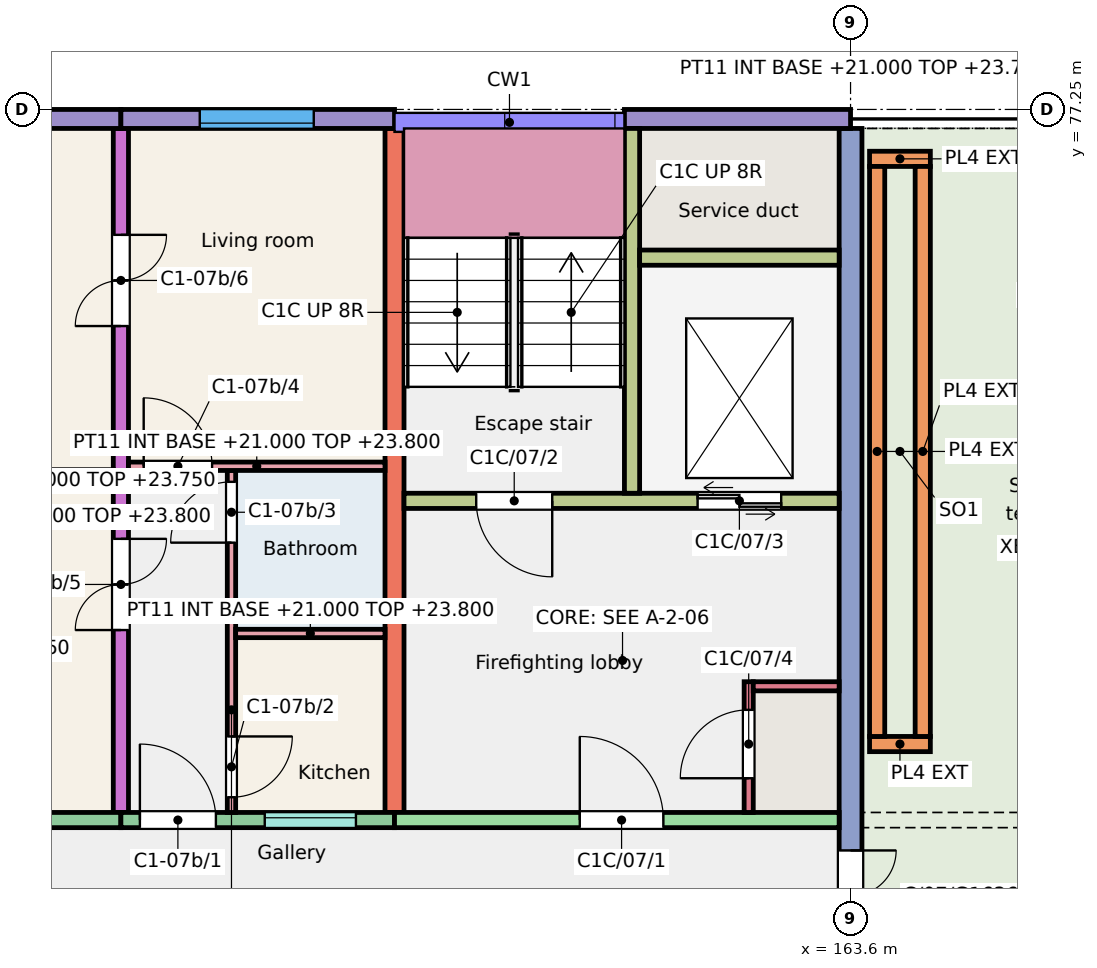
"""IFC4 building model, lengths in metres.
Left out: names, types, materials, properties, quantities, classifications, styles, units other than length and angle.
Written with IfcOpenShell. Run it as: python <this file> out.ifc"""

import sys

from ifc_helpers import new_model, si_unit, direction, frame, frame_2d, origin, place, context, subcontext, project, spatial, rectangle, extrude, element, fill, save


model = new_model("IFC4")
c1 = context("Model", 3, precision=1e-05, world=origin(), true_north=direction((0.0, 1.0)))
c2 = subcontext(c1, "Body", "Model", "MODEL_VIEW")
j1 = project(units=[si_unit("LENGTHUNIT", "METRE"), si_unit("PLANEANGLEUNIT", "RADIAN")], contexts=[c1])
p1 = place(None, origin())
s1 = spatial("IfcSite", under=j1, at=p1, CompositionType="ELEMENT")
p2 = place(p1, origin())
s2 = spatial("IfcBuilding", under=s1, at=p2, CompositionType="ELEMENT")
p3 = place(p2, frame((0.0, 0.0, 21.0)))
s3 = spatial("IfcBuildingStorey", under=s2, at=p3, CompositionType="ELEMENT", Elevation=21.0)
p4 = place(p3, frame((154.0, 68.0, 0.0), z_axis=(0.0, 0.0, 1.0), x_axis=(0.0, 1.0, 0.0)))
e1 = element("IfcWall", 1, at=p4, inside=s3, PredefinedType="SHEAR", context=c2, shape_type="SweptSolid", body=[
    extrude(rectangle(XDim=9.0, YDim=0.2, at=frame_2d((4.5, 0.0))), origin(), (0.0, 0.0, 1.0), 3.0),
])
p5 = place(p4, frame((2.4, 0.0, 0.0)))
e2 = element("IfcOpeningElement", 2, at=p5, cuts=e1, PredefinedType="OPENING", context=c2, shape_type="SweptSolid", body=[
    extrude(rectangle(XDim=1.2, YDim=2.1, at=frame_2d((0.6, 1.05))), frame((0.0, 0.11, 0.0), z_axis=(0.0, -1.0, 0.0), x_axis=(1.0, 0.0, 0.0)), (0.0, 0.0, 1.0), 0.22),
])
p6 = place(p4, frame((6.4, 0.0, 0.0)))
e3 = element("IfcOpeningElement", 3, at=p6, cuts=e1, PredefinedType="OPENING", context=c2, shape_type="SweptSolid", body=[
    extrude(rectangle(XDim=1.2, YDim=2.1, at=frame_2d((0.6, 1.05))), frame((0.0, 0.11, 0.0), z_axis=(0.0, -1.0, 0.0), x_axis=(1.0, 0.0, 0.0)), (0.0, 0.0, 1.0), 0.22),
])
p7 = place(p3, frame((157.6, 68.0, 0.0), z_axis=(0.0, 0.0, 1.0), x_axis=(0.0, 1.0, 0.0)))
e4 = element("IfcWall", 4, at=p7, inside=s3, PredefinedType="SHEAR", context=c2, shape_type="SweptSolid", body=[
    extrude(rectangle(XDim=9.0, YDim=0.25, at=frame_2d((4.5, 0.0))), origin(), (0.0, 0.0, 1.0), 3.0),
])
p8 = place(p3, frame((163.6, 66.0, 0.0), z_axis=(0.0, 0.0, 1.0), x_axis=(0.0, 1.0, 0.0)))
e5 = element("IfcWall", 5, at=p8, inside=s3, PredefinedType="SHEAR", context=c2, shape_type="SweptSolid", body=[
    extrude(rectangle(XDim=11.0, YDim=0.3, at=frame_2d((5.5, 0.0))), origin(), (0.0, 0.0, 1.0), 3.0),
])
p9 = place(p8, frame((0.3, 0.0, 0.0)))
e6 = element("IfcOpeningElement", 6, at=p9, cuts=e5, PredefinedType="OPENING", context=c2, shape_type="SweptSolid", body=[
    extrude(rectangle(XDim=1.2, YDim=2.1, at=frame_2d((0.6, 1.05))), frame((0.0, 0.16, 0.0), z_axis=(0.0, -1.0, 0.0), x_axis=(1.0, 0.0, 0.0)), (0.0, 0.0, 1.0), 0.32),
])
p10 = place(p3, frame((150.4, 77.125, 0.0), z_axis=(0.0, 0.0, 1.0), x_axis=(1.0, 0.0, 0.0)))
e7 = element("IfcWall", 7, at=p10, inside=s3, PredefinedType="SOLIDWALL", context=c2, shape_type="SweptSolid", body=[
    extrude(rectangle(XDim=3.6, YDim=0.25, at=frame_2d((1.8, 0.0))), origin(), (0.0, 0.0, 1.0), 3.0),
])
p11 = place(p10, frame((1.05, 0.0, 0.9)))
e8 = element("IfcOpeningElement", 8, at=p11, cuts=e7, PredefinedType="OPENING", context=c2, shape_type="SweptSolid", body=[
    extrude(rectangle(XDim=1.5, YDim=1.5, at=frame_2d((0.75, 0.75))), frame((0.0, 0.135, 0.0), z_axis=(0.0, -1.0, 0.0), x_axis=(1.0, 0.0, 0.0)), (0.0, 0.0, 1.0), 0.27),
])
p12 = place(p3, frame((150.4, 67.9, 0.0), z_axis=(0.0, 0.0, 1.0), x_axis=(1.0, 0.0, 0.0)))
e9 = element("IfcWall", 9, at=p12, inside=s3, PredefinedType="SOLIDWALL", context=c2, shape_type="SweptSolid", body=[
    extrude(rectangle(XDim=3.6, YDim=0.2, at=frame_2d((1.8, 0.0))), origin(), (0.0, 0.0, 1.0), 3.0),
])
p13 = place(p12, frame((1.05, 0.0, 0.9)))
e10 = element("IfcOpeningElement", 10, at=p13, cuts=e9, PredefinedType="OPENING", context=c2, shape_type="SweptSolid", body=[
    extrude(rectangle(XDim=1.5, YDim=1.5, at=frame_2d((0.75, 0.75))), frame((0.0, 0.11, 0.0), z_axis=(0.0, -1.0, 0.0), x_axis=(1.0, 0.0, 0.0)), (0.0, 0.0, 1.0), 0.22),
])
p14 = place(p3, frame((154.0, 77.125, 0.0), z_axis=(0.0, 0.0, 1.0), x_axis=(1.0, 0.0, 0.0)))
e11 = element("IfcWall", 11, at=p14, inside=s3, PredefinedType="SOLIDWALL", context=c2, shape_type="SweptSolid", body=[
    extrude(rectangle(XDim=3.6, YDim=0.25, at=frame_2d((1.8, 0.0))), origin(), (0.0, 0.0, 1.0), 3.0),
])
p15 = place(p14, frame((1.038, 0.0, 0.9)))
e12 = element("IfcOpeningElement", 12, at=p15, cuts=e11, PredefinedType="OPENING", context=c2, shape_type="SweptSolid", body=[
    extrude(rectangle(XDim=1.5, YDim=1.5, at=frame_2d((0.75, 0.75))), frame((0.0, 0.135, 0.0), z_axis=(0.0, -1.0, 0.0), x_axis=(1.0, 0.0, 0.0)), (0.0, 0.0, 1.0), 0.27),
])
p16 = place(p3, frame((154.0, 67.9, 0.0), z_axis=(0.0, 0.0, 1.0), x_axis=(1.0, 0.0, 0.0)))
e13 = element("IfcWall", 13, at=p16, inside=s3, PredefinedType="SOLIDWALL", context=c2, shape_type="SweptSolid", body=[
    extrude(rectangle(XDim=3.6, YDim=0.2, at=frame_2d((1.8, 0.0))), origin(), (0.0, 0.0, 1.0), 3.0),
])
p17 = place(p16, frame((1.893, 0.0, 1.1)))
e14 = element("IfcOpeningElement", 14, at=p17, cuts=e13, PredefinedType="OPENING", context=c2, shape_type="SweptSolid", body=[
    extrude(rectangle(XDim=1.2, YDim=1.3, at=frame_2d((0.6, 0.65))), frame((0.0, 0.11, 0.0), z_axis=(0.0, -1.0, 0.0), x_axis=(1.0, 0.0, 0.0)), (0.0, 0.0, 1.0), 0.22),
])
p18 = place(p16, frame((0.25, 0.0, 0.0)))
e15 = element("IfcOpeningElement", 15, at=p18, cuts=e13, PredefinedType="OPENING", context=c2, shape_type="SweptSolid", body=[
    extrude(rectangle(XDim=1.0, YDim=2.1, at=frame_2d((0.5, 1.05))), frame((0.0, 0.11, 0.0), z_axis=(0.0, -1.0, 0.0), x_axis=(1.0, 0.0, 0.0)), (0.0, 0.0, 1.0), 0.22),
])
p19 = place(p3, frame((160.625, 77.125, 0.0), z_axis=(0.0, 0.0, 1.0), x_axis=(1.0, 0.0, 0.0)))
e16 = element("IfcWall", 16, at=p19, inside=s3, PredefinedType="SOLIDWALL", context=c2, shape_type="SweptSolid", body=[
    extrude(rectangle(XDim=2.975, YDim=0.25, at=frame_2d((1.488, 0.0))), origin(), (0.0, 0.0, 1.0), 3.0),
])
p20 = place(p3, frame((157.6, 67.9, 0.0), z_axis=(0.0, 0.0, 1.0), x_axis=(1.0, 0.0, 0.0)))
e17 = element("IfcWall", 17, at=p20, inside=s3, PredefinedType="SHEAR", context=c2, shape_type="SweptSolid", body=[
    extrude(rectangle(XDim=5.85, YDim=0.2, at=frame_2d((2.925, 0.0))), origin(), (0.0, 0.0, 1.0), 3.0),
])
p21 = place(p20, frame((2.438, 0.0, 0.0)))
e18 = element("IfcOpeningElement", 18, at=p21, cuts=e17, PredefinedType="OPENING", context=c2, shape_type="SweptSolid", body=[
    extrude(rectangle(XDim=1.1, YDim=2.1, at=frame_2d((0.55, 1.05))), frame((0.0, 0.11, 0.0), z_axis=(0.0, -1.0, 0.0), x_axis=(1.0, 0.0, 0.0)), (0.0, 0.0, 1.0), 0.22),
])
p22 = place(p3, frame((157.725, 72.1, 0.0), z_axis=(0.0, 0.0, 1.0), x_axis=(1.0, 0.0, 0.0)))
e19 = element("IfcWall", 19, at=p22, inside=s3, PredefinedType="SHEAR", context=c2, shape_type="SweptSolid", body=[
    extrude(rectangle(XDim=5.725, YDim=0.2, at=frame_2d((2.862, 0.0))), origin(), (0.0, 0.0, 1.0), 3.0),
])
p23 = place(p22, frame((0.95, 0.0, 0.0)))
e20 = element("IfcOpeningElement", 20, at=p23, cuts=e19, PredefinedType="OPENING", context=c2, shape_type="SweptSolid", body=[
    extrude(rectangle(XDim=1.0, YDim=2.1, at=frame_2d((0.5, 1.05))), frame((0.0, 0.11, 0.0), z_axis=(0.0, -1.0, 0.0), x_axis=(1.0, 0.0, 0.0)), (0.0, 0.0, 1.0), 0.22),
])
p24 = place(p22, frame((3.863, 0.0, 0.0)))
e21 = element("IfcOpeningElement", 21, at=p24, cuts=e19, PredefinedType="OPENING", context=c2, shape_type="SweptSolid", body=[
    extrude(rectangle(XDim=1.1, YDim=2.1, at=frame_2d((0.55, 1.05))), frame((0.0, 0.11, 0.0), z_axis=(0.0, -1.0, 0.0), x_axis=(1.0, 0.0, 0.0)), (0.0, 0.0, 1.0), 0.22),
])
p25 = place(p3, frame((160.725, 72.2, 0.0), z_axis=(0.0, 0.0, 1.0), x_axis=(0.0, 1.0, 0.0)))
e22 = element("IfcWall", 22, at=p25, inside=s3, PredefinedType="SHEAR", context=c2, shape_type="SweptSolid", body=[
    extrude(rectangle(XDim=4.8, YDim=0.2, at=frame_2d((2.4, 0.0))), origin(), (0.0, 0.0, 1.0), 3.0),
])
p26 = place(p3, frame((160.825, 75.3, 0.0), z_axis=(0.0, 0.0, 1.0), x_axis=(1.0, 0.0, 0.0)))
e23 = element("IfcWall", 23, at=p26, inside=s3, PredefinedType="SHEAR", context=c2, shape_type="SweptSolid", body=[
    extrude(rectangle(XDim=2.625, YDim=0.2, at=frame_2d((1.312, 0.0))), origin(), (0.0, 0.0, 1.0), 3.0),
])
p27 = place(p3, frame((162.26, 68.0, 0.0), z_axis=(0.0, 0.0, 1.0), x_axis=(0.0, 1.0, 0.0)))
e24 = element("IfcWall", 24, at=p27, inside=s3, PredefinedType="SHEAR", context=c2, shape_type="SweptSolid", body=[
    extrude(rectangle(XDim=1.72, YDim=0.12, at=frame_2d((0.86, 0.0))), origin(), (0.0, 0.0, 1.0), 3.0),
])
p28 = place(p27, frame((0.45, 0.0, 0.0)))
e25 = element("IfcOpeningElement", 25, at=p28, cuts=e24, PredefinedType="OPENING", context=c2, shape_type="SweptSolid", body=[
    extrude(rectangle(XDim=0.9, YDim=2.1, at=frame_2d((0.45, 1.05))), frame((0.0, 0.07, 0.0), z_axis=(0.0, -1.0, 0.0), x_axis=(1.0, 0.0, 0.0)), (0.0, 0.0, 1.0), 0.14),
])
p29 = place(p3, frame((162.32, 69.66, 0.0), z_axis=(0.0, 0.0, 1.0), x_axis=(1.0, 0.0, 0.0)))
e26 = element("IfcWall", 26, at=p29, inside=s3, PredefinedType="SHEAR", context=c2, shape_type="SweptSolid", body=[
    extrude(rectangle(XDim=1.13, YDim=0.12, at=frame_2d((0.565, 0.0))), origin(), (0.0, 0.0, 1.0), 3.0),
])
for number, where, z_axis, x_axis in (
    (27, (163.85, 68.9, 0.01), (0.0, 0.0, 1.0), (1.0, 0.0, 0.0)),
    (28, (163.85, 76.6, 0.01), (0.0, 0.0, 1.0), (1.0, 0.0, 0.0)),
):
    element("IfcWall", number, at=place(p3, frame(where, z_axis=z_axis, x_axis=x_axis)), inside=s3, PredefinedType="SOLIDWALL", context=c2, shape_type="SweptSolid", body=[
        extrude(rectangle(XDim=0.8, YDim=0.2, at=frame_2d((0.4, 0.0))), origin(), (0.0, 0.0, 1.0), 0.45),
    ])
for number, where, z_axis, x_axis in (
    (29, (163.95, 69.0, 0.01), (0.0, 0.0, 1.0), (0.0, 1.0, 0.0)),
    (30, (164.55, 69.0, 0.01), (0.0, 0.0, 1.0), (0.0, 1.0, 0.0)),
):
    element("IfcWall", number, at=place(p3, frame(where, z_axis=z_axis, x_axis=x_axis)), inside=s3, PredefinedType="SOLIDWALL", context=c2, shape_type="SweptSolid", body=[
        extrude(rectangle(XDim=7.5, YDim=0.2, at=frame_2d((3.75, 0.0))), origin(), (0.0, 0.0, 1.0), 0.45),
    ])
p30 = place(p3, frame((155.455, 68.0, 0.0), z_axis=(0.0, 0.0, 1.0), x_axis=(0.0, 1.0, 0.0)))
e31 = element("IfcWall", 31, at=p30, inside=s3, PredefinedType="PARTITIONING", context=c2, shape_type="SweptSolid", body=[
    extrude(rectangle(XDim=4.5, YDim=0.11, at=frame_2d((2.25, 0.0))), origin(), (0.0, 0.0, 1.0), 2.8),
])
p31 = place(p30, frame((0.2, 0.0, 0.0)))
e32 = element("IfcOpeningElement", 32, at=p31, cuts=e31, PredefinedType="OPENING", context=c2, shape_type="SweptSolid", body=[
    extrude(rectangle(XDim=0.8, YDim=2.1, at=frame_2d((0.4, 1.05))), frame((0.0, 0.065, 0.0), z_axis=(0.0, -1.0, 0.0), x_axis=(1.0, 0.0, 0.0)), (0.0, 0.0, 1.0), 0.13),
])
p32 = place(p30, frame((3.55, 0.0, 0.0)))
e33 = element("IfcOpeningElement", 33, at=p32, cuts=e31, PredefinedType="OPENING", context=c2, shape_type="SweptSolid", body=[
    extrude(rectangle(XDim=0.8, YDim=2.1, at=frame_2d((0.4, 1.05))), frame((0.0, 0.065, 0.0), z_axis=(0.0, -1.0, 0.0), x_axis=(1.0, 0.0, 0.0)), (0.0, 0.0, 1.0), 0.13),
])
p33 = place(p3, frame((155.51, 70.355, 0.0), z_axis=(0.0, 0.0, 1.0), x_axis=(1.0, 0.0, 0.0)))
e34 = element("IfcWall", 34, at=p33, inside=s3, PredefinedType="PARTITIONING", context=c2, shape_type="SweptSolid", body=[
    extrude(rectangle(XDim=1.965, YDim=0.11, at=frame_2d((0.982, 0.0))), origin(), (0.0, 0.0, 1.0), 2.8),
])
p34 = place(p3, frame((154.1, 72.555, 0.0), z_axis=(0.0, 0.0, 1.0), x_axis=(1.0, 0.0, 0.0)))
e35 = element("IfcWall", 35, at=p34, inside=s3, PredefinedType="PARTITIONING", context=c2, shape_type="SweptSolid", body=[
    extrude(rectangle(XDim=3.375, YDim=0.11, at=frame_2d((1.688, 0.0))), origin(), (0.0, 0.0, 1.0), 2.8),
])
p35 = place(p34, frame((0.2, 0.0, 0.0)))
e36 = element("IfcOpeningElement", 36, at=p35, cuts=e35, PredefinedType="OPENING", context=c2, shape_type="SweptSolid", body=[
    extrude(rectangle(XDim=0.9, YDim=2.1, at=frame_2d((0.45, 1.05))), frame((0.0, 0.065, 0.0), z_axis=(0.0, -1.0, 0.0), x_axis=(1.0, 0.0, 0.0)), (0.0, 0.0, 1.0), 0.13),
])
p36 = place(p3, frame((150.5, 72.455, 0.0), z_axis=(0.0, 0.0, 1.0), x_axis=(1.0, 0.0, 0.0)))
e37 = element("IfcWall", 37, at=p36, inside=s3, PredefinedType="PARTITIONING", context=c2, shape_type="SweptSolid", body=[
    extrude(rectangle(XDim=3.4, YDim=0.11, at=frame_2d((1.7, 0.0))), origin(), (0.0, 0.0, 1.0), 2.8),
])
p37 = place(p17, origin())
e38 = element("IfcWindow", 38, at=p37, inside=s3, PartitioningType="SINGLE_PANEL", PredefinedType="WINDOW", context=c2, shape_type="SweptSolid", body=[
    extrude(rectangle(XDim=1.2, YDim=1.3, at=frame_2d((0.6, 0.65))), frame((0.0, 0.06, 0.0), z_axis=(0.0, -1.0, 0.0), x_axis=(1.0, 0.0, 0.0)), (0.0, 0.0, 1.0), 0.06),
])
fill(e14, e38)
p38 = place(p15, origin())
e39 = element("IfcWindow", 39, at=p38, inside=s3, PartitioningType="SINGLE_PANEL", PredefinedType="WINDOW", context=c2, shape_type="SweptSolid", body=[
    extrude(rectangle(XDim=1.5, YDim=1.5, at=frame_2d((0.75, 0.75))), frame((0.0, -0.025, 0.0), z_axis=(0.0, -1.0, 0.0), x_axis=(1.0, 0.0, 0.0)), (0.0, 0.0, 1.0), 0.06),
])
fill(e12, e39)
p39 = place(p18, origin())
e40 = element("IfcDoor", 40, at=p39, inside=s3, OperationType="SINGLE_SWING_LEFT", PredefinedType="DOOR", context=c2, shape_type="SweptSolid", body=[
    extrude(rectangle(XDim=1.0, YDim=2.1, at=frame_2d((0.5, 1.05))), frame((0.0, 0.025, 0.0), z_axis=(0.0, -1.0, 0.0), x_axis=(1.0, 0.0, 0.0)), (0.0, 0.0, 1.0), 0.05),
])
fill(e15, e40)
p40 = place(p31, origin())
e41 = element("IfcDoor", 41, at=p40, inside=s3, OperationType="SINGLE_SWING_RIGHT", PredefinedType="DOOR", context=c2, shape_type="SweptSolid", body=[
    extrude(rectangle(XDim=0.8, YDim=2.1, at=frame_2d((0.4, 1.05))), frame((0.0, 0.025, 0.0), z_axis=(0.0, -1.0, 0.0), x_axis=(1.0, 0.0, 0.0)), (0.0, 0.0, 1.0), 0.05),
])
fill(e32, e41)
p41 = place(p32, origin())
e42 = element("IfcDoor", 42, at=p41, inside=s3, OperationType="SINGLE_SWING_LEFT", PredefinedType="DOOR", context=c2, shape_type="SweptSolid", body=[
    extrude(rectangle(XDim=0.8, YDim=2.1, at=frame_2d((0.4, 1.05))), frame((0.0, 0.025, 0.0), z_axis=(0.0, -1.0, 0.0), x_axis=(1.0, 0.0, 0.0)), (0.0, 0.0, 1.0), 0.05),
])
fill(e33, e42)
p42 = place(p35, origin())
e43 = element("IfcDoor", 43, at=p42, inside=s3, OperationType="SINGLE_SWING_LEFT", PredefinedType="DOOR", context=c2, shape_type="SweptSolid", body=[
    extrude(rectangle(XDim=0.9, YDim=2.1, at=frame_2d((0.45, 1.05))), frame((0.0, 0.025, 0.0), z_axis=(0.0, -1.0, 0.0), x_axis=(1.0, 0.0, 0.0)), (0.0, 0.0, 1.0), 0.05),
])
fill(e36, e43)
p43 = place(p5, origin())
e44 = element("IfcDoor", 44, at=p43, inside=s3, OperationType="DOUBLE_DOOR_SINGLE_SWING", PredefinedType="DOOR", context=c2, shape_type="SweptSolid", body=[
    extrude(rectangle(XDim=1.2, YDim=2.1, at=frame_2d((0.6, 1.05))), frame((0.0, 0.025, 0.0), z_axis=(0.0, -1.0, 0.0), x_axis=(1.0, 0.0, 0.0)), (0.0, 0.0, 1.0), 0.05),
])
fill(e2, e44)
p44 = place(p6, origin())
e45 = element("IfcDoor", 45, at=p44, inside=s3, OperationType="DOUBLE_DOOR_SINGLE_SWING", PredefinedType="DOOR", context=c2, shape_type="SweptSolid", body=[
    extrude(rectangle(XDim=1.2, YDim=2.1, at=frame_2d((0.6, 1.05))), frame((0.0, 0.025, 0.0), z_axis=(0.0, -1.0, 0.0), x_axis=(1.0, 0.0, 0.0)), (0.0, 0.0, 1.0), 0.05),
])
fill(e3, e45)
p45 = place(p21, origin())
e46 = element("IfcDoor", 46, at=p45, inside=s3, OperationType="SINGLE_SWING_LEFT", PredefinedType="DOOR", context=c2, shape_type="SweptSolid", body=[
    extrude(rectangle(XDim=1.1, YDim=2.1, at=frame_2d((0.55, 1.05))), frame((0.0, 0.025, 0.0), z_axis=(0.0, -1.0, 0.0), x_axis=(1.0, 0.0, 0.0)), (0.0, 0.0, 1.0), 0.05),
])
fill(e18, e46)
p46 = place(p23, origin())
e47 = element("IfcDoor", 47, at=p46, inside=s3, OperationType="SINGLE_SWING_RIGHT", PredefinedType="DOOR", context=c2, shape_type="SweptSolid", body=[
    extrude(rectangle(XDim=1.0, YDim=2.1, at=frame_2d((0.5, 1.05))), frame((0.0, 0.025, 0.0), z_axis=(0.0, -1.0, 0.0), x_axis=(1.0, 0.0, 0.0)), (0.0, 0.0, 1.0), 0.05),
])
fill(e20, e47)
p47 = place(p24, origin())
e48 = element("IfcDoor", 48, at=p47, inside=s3, OperationType="DOUBLE_DOOR_SLIDING", PredefinedType="DOOR", context=c2, shape_type="SweptSolid", body=[
    extrude(rectangle(XDim=1.1, YDim=2.1, at=frame_2d((0.55, 1.05))), frame((0.0, 0.025, 0.0), z_axis=(0.0, -1.0, 0.0), x_axis=(1.0, 0.0, 0.0)), (0.0, 0.0, 1.0), 0.05),
])
fill(e21, e48)
p48 = place(p28, origin())
e49 = element("IfcDoor", 49, at=p48, inside=s3, OperationType="SINGLE_SWING_LEFT", PredefinedType="DOOR", context=c2, shape_type="SweptSolid", body=[
    extrude(rectangle(XDim=0.9, YDim=2.1, at=frame_2d((0.45, 1.05))), frame((0.0, 0.025, 0.0), z_axis=(0.0, -1.0, 0.0), x_axis=(1.0, 0.0, 0.0)), (0.0, 0.0, 1.0), 0.05),
])
fill(e25, e49)
p49 = place(p9, origin())
e50 = element("IfcDoor", 50, at=p49, inside=s3, OperationType="DOUBLE_DOOR_SINGLE_SWING", PredefinedType="DOOR", context=c2, shape_type="SweptSolid", body=[
    extrude(rectangle(XDim=1.2, YDim=2.1, at=frame_2d((0.6, 1.05))), frame((0.0, 0.025, 0.0), z_axis=(0.0, -1.0, 0.0), x_axis=(1.0, 0.0, 0.0)), (0.0, 0.0, 1.0), 0.05),
])
fill(e6, e50)
save(model, sys.argv[1])
